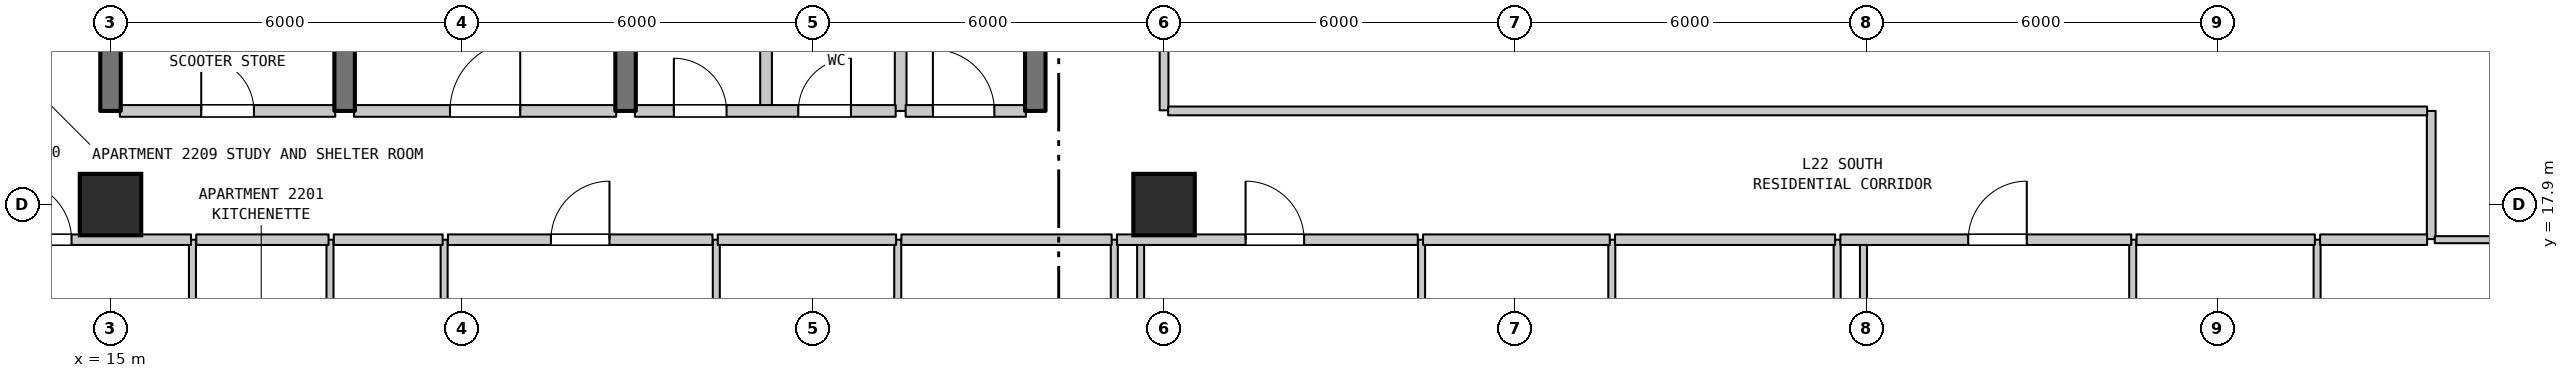
"""IFC4 building model, lengths in metres.
Left out: names, types, materials, properties, quantities, classifications, styles, units other than length and angle.
Written with IfcOpenShell. Run it as: python <this file> out.ifc"""

import sys

from ifc_helpers import new_model, si_unit, direction, frame, frame_2d, origin, origin_2d, place, context, subcontext, project, spatial, rectangle, extrude, element, fill, save


model = new_model("IFC4")
c1 = context("Model", 3, precision=1e-05, world=origin(), true_north=direction((0.0, 1.0)))
c2 = subcontext(c1, "Body", "Model", "MODEL_VIEW")
j1 = project(units=[si_unit("LENGTHUNIT", "METRE"), si_unit("PLANEANGLEUNIT", "RADIAN")], contexts=[c1])
p1 = place(None, origin())
s1 = spatial("IfcSite", under=j1, at=p1, CompositionType="ELEMENT")
p2 = place(p1, origin())
s2 = spatial("IfcBuilding", under=s1, at=p2, CompositionType="ELEMENT")
p3 = place(p2, frame((0.0, 0.0, 94.6)))
s3 = spatial("IfcBuildingStorey", under=s2, at=p3, CompositionType="ELEMENT", Elevation=94.6)
for number, where, z_axis, x_axis in (
    (1, (15.0, 17.9, 0.0), (0.0, 0.0, 1.0), (1.0, 0.0, 0.0)),
    (2, (33.0, 17.9, 0.0), (0.0, 0.0, 1.0), (1.0, 0.0, 0.0)),
):
    element("IfcColumn", number, at=place(p3, frame(where, z_axis=z_axis, x_axis=x_axis)), inside=s3, PredefinedType="COLUMN", context=c2, shape_type="SweptSolid", body=[
        extrude(rectangle(XDim=1.05, YDim=1.05, at=origin_2d()), origin(), (0.0, 0.0, 1.0), 3.7),
    ])
p4 = place(p3, frame((15.0, 19.5, 0.0), z_axis=(0.0, 0.0, 1.0), x_axis=(0.0, 1.0, 0.0)))
e3 = element("IfcWall", 3, at=p4, inside=s3, PredefinedType="SHEAR", context=c2, shape_type="SweptSolid", body=[
    extrude(rectangle(XDim=3.2, YDim=0.35, at=frame_2d((1.6, 0.0))), origin(), (0.0, 0.0, 1.0), 3.385),
])
p5 = place(p3, frame((16.4, 14.1, 0.0), z_axis=(0.0, 0.0, 1.0), x_axis=(0.0, 1.0, 0.0)))
e4 = element("IfcWall", 4, at=p5, inside=s3, PredefinedType="PARTITIONING", context=c2, shape_type="SweptSolid", body=[
    extrude(rectangle(XDim=3.2, YDim=0.12, at=frame_2d((1.6, 0.0))), origin(), (0.0, 0.0, 1.0), 3.385),
])
p6 = place(p5, frame((1.15, 0.0, 0.0)))
e5 = element("IfcOpeningElement", 5, at=p6, cuts=e4, PredefinedType="OPENING", context=c2, shape_type="SweptSolid", body=[
    extrude(rectangle(XDim=0.9, YDim=2.15, at=frame_2d((0.45, 1.075))), frame((0.0, 0.07, 0.0), z_axis=(0.0, -1.0, 0.0), x_axis=(1.0, 0.0, 0.0)), (0.0, 0.0, 1.0), 0.14),
])
p7 = place(p3, frame((18.75, 14.1, 0.0), z_axis=(0.0, 0.0, 1.0), x_axis=(0.0, 1.0, 0.0)))
e6 = element("IfcWall", 6, at=p7, inside=s3, PredefinedType="PARTITIONING", context=c2, shape_type="SweptSolid", body=[
    extrude(rectangle(XDim=3.2, YDim=0.12, at=frame_2d((1.6, 0.0))), origin(), (0.0, 0.0, 1.0), 3.385),
])
p8 = place(p3, frame((19.0, 19.5, 0.0), z_axis=(0.0, 0.0, 1.0), x_axis=(0.0, 1.0, 0.0)))
e7 = element("IfcWall", 7, at=p8, inside=s3, PredefinedType="SHEAR", context=c2, shape_type="SweptSolid", body=[
    extrude(rectangle(XDim=3.2, YDim=0.35, at=frame_2d((1.6, 0.0))), origin(), (0.0, 0.0, 1.0), 3.385),
])
p9 = place(p3, frame((20.7, 6.977, 0.0), z_axis=(0.0, 0.0, 1.0), x_axis=(0.0, 1.0, 0.0)))
e8 = element("IfcWall", 8, at=p9, inside=s3, PredefinedType="PARTITIONING", context=c2, shape_type="SweptSolid", body=[
    extrude(rectangle(XDim=10.323, YDim=0.12, at=frame_2d((5.162, 0.0))), origin(), (0.0, 0.0, 1.0), 3.385),
])
p10 = place(p3, frame((23.8, 19.5, 0.0), z_axis=(0.0, 0.0, 1.0), x_axis=(0.0, 1.0, 0.0)))
e9 = element("IfcWall", 9, at=p10, inside=s3, PredefinedType="SHEAR", context=c2, shape_type="SweptSolid", body=[
    extrude(rectangle(XDim=3.2, YDim=0.35, at=frame_2d((1.6, 0.0))), origin(), (0.0, 0.0, 1.0), 3.385),
])
p11 = place(p3, frame((25.35, 11.15, 0.0), z_axis=(0.0, 0.0, 1.0), x_axis=(0.0, 1.0, 0.0)))
e10 = element("IfcWall", 10, at=p11, inside=s3, PredefinedType="PARTITIONING", context=c2, shape_type="SweptSolid", body=[
    extrude(rectangle(XDim=6.15, YDim=0.12, at=frame_2d((3.075, 0.0))), origin(), (0.0, 0.0, 1.0), 3.385),
])
p12 = place(p3, frame((26.2, 19.5, 0.0), z_axis=(0.0, 0.0, 1.0), x_axis=(0.0, 1.0, 0.0)))
e11 = element("IfcWall", 11, at=p12, inside=s3, PredefinedType="STANDARD", context=c2, shape_type="SweptSolid", body=[
    extrude(rectangle(XDim=3.2, YDim=0.2, at=frame_2d((1.6, 0.0))), origin(), (0.0, 0.0, 1.0), 3.385),
])
p13 = place(p3, frame((28.45, 11.15, 0.0), z_axis=(0.0, 0.0, 1.0), x_axis=(0.0, 1.0, 0.0)))
e12 = element("IfcWall", 12, at=p13, inside=s3, PredefinedType="PARTITIONING", context=c2, shape_type="SweptSolid", body=[
    extrude(rectangle(XDim=6.15, YDim=0.12, at=frame_2d((3.075, 0.0))), origin(), (0.0, 0.0, 1.0), 3.385),
])
p14 = place(p3, frame((28.5, 19.5, 0.0), z_axis=(0.0, 0.0, 1.0), x_axis=(0.0, 1.0, 0.0)))
e13 = element("IfcWall", 13, at=p14, inside=s3, PredefinedType="STANDARD", context=c2, shape_type="SweptSolid", body=[
    extrude(rectangle(XDim=3.2, YDim=0.2, at=frame_2d((1.6, 0.0))), origin(), (0.0, 0.0, 1.0), 3.385),
])
p15 = place(p3, frame((30.8, 19.5, 0.0), z_axis=(0.0, 0.0, 1.0), x_axis=(0.0, 1.0, 0.0)))
e14 = element("IfcWall", 14, at=p15, inside=s3, PredefinedType="SHEAR", context=c2, shape_type="SweptSolid", body=[
    extrude(rectangle(XDim=3.2, YDim=0.35, at=frame_2d((1.6, 0.0))), origin(), (0.0, 0.0, 1.0), 3.385),
])
p16 = place(p3, frame((32.15, 11.15, 0.0), z_axis=(0.0, 0.0, 1.0), x_axis=(0.0, 1.0, 0.0)))
e15 = element("IfcWall", 15, at=p16, inside=s3, PredefinedType="PARTITIONING", context=c2, shape_type="SweptSolid", body=[
    extrude(rectangle(XDim=6.15, YDim=0.12, at=frame_2d((3.075, 0.0))), origin(), (0.0, 0.0, 1.0), 3.385),
])
p17 = place(p3, frame((32.6, 14.85, 0.0), z_axis=(0.0, 0.0, 1.0), x_axis=(0.0, 1.0, 0.0)))
e16 = element("IfcWall", 16, at=p17, inside=s3, PredefinedType="PARTITIONING", context=c2, shape_type="SweptSolid", body=[
    extrude(rectangle(XDim=2.45, YDim=0.12, at=frame_2d((1.225, 0.0))), origin(), (0.0, 0.0, 1.0), 3.385),
])
p18 = place(p3, frame((33.0, 19.51, 0.0), z_axis=(0.0, 0.0, 1.0), x_axis=(0.0, 1.0, 0.0)))
e17 = element("IfcWall", 17, at=p18, inside=s3, PredefinedType="STANDARD", context=c2, shape_type="SweptSolid", body=[
    extrude(rectangle(XDim=6.18, YDim=0.15, at=frame_2d((3.09, 0.0))), origin(), (0.0, 0.0, 1.0), 2.935),
])
for number, where, z_axis, x_axis in (
    (18, (37.4, 11.15, 0.0), (0.0, 0.0, 1.0), (0.0, 1.0, 0.0)),
    (19, (40.65, 11.15, 0.0), (0.0, 0.0, 1.0), (0.0, 1.0, 0.0)),
    (20, (44.5, 11.15, 0.0), (0.0, 0.0, 1.0), (0.0, 1.0, 0.0)),
):
    element("IfcWall", number, at=place(p3, frame(where, z_axis=z_axis, x_axis=x_axis)), inside=s3, PredefinedType="PARTITIONING", context=c2, shape_type="SweptSolid", body=[
        extrude(rectangle(XDim=6.15, YDim=0.12, at=frame_2d((3.075, 0.0))), origin(), (0.0, 0.0, 1.0), 3.385),
    ])
p19 = place(p3, frame((44.95, 0.71, 0.0), z_axis=(0.0, 0.0, 1.0), x_axis=(0.0, 1.0, 0.0)))
e21 = element("IfcWall", 21, at=p19, inside=s3, PredefinedType="PARTITIONING", context=c2, shape_type="SweptSolid", body=[
    extrude(rectangle(XDim=16.59, YDim=0.12, at=frame_2d((8.295, 0.0))), origin(), (0.0, 0.0, 1.0), 3.385),
])
for number, where, z_axis, x_axis in (
    (22, (49.55, 11.15, 0.0), (0.0, 0.0, 1.0), (0.0, 1.0, 0.0)),
    (23, (52.7, 11.15, 0.0), (0.0, 0.0, 1.0), (0.0, 1.0, 0.0)),
):
    element("IfcWall", number, at=place(p3, frame(where, z_axis=z_axis, x_axis=x_axis)), inside=s3, PredefinedType="PARTITIONING", context=c2, shape_type="SweptSolid", body=[
        extrude(rectangle(XDim=6.15, YDim=0.12, at=frame_2d((3.075, 0.0))), origin(), (0.0, 0.0, 1.0), 3.385),
    ])
p20 = place(p3, frame((54.65, 17.31, 0.0), z_axis=(0.0, 0.0, 1.0), x_axis=(0.0, 1.0, 0.0)))
e24 = element("IfcWall", 24, at=p20, inside=s3, PredefinedType="STANDARD", context=c2, shape_type="SweptSolid", body=[
    extrude(rectangle(XDim=2.19, YDim=0.15, at=frame_2d((1.095, 0.0))), origin(), (0.0, 0.0, 1.0), 3.385),
])
p21 = place(p3, frame((12.875, 17.3, 0.0), z_axis=(0.0, 0.0, 1.0), x_axis=(1.0, 0.0, 0.0)))
e25 = element("IfcWall", 25, at=p21, inside=s3, PredefinedType="STANDARD", context=c2, shape_type="SweptSolid", body=[
    extrude(rectangle(XDim=3.5, YDim=0.18, at=frame_2d((1.75, 0.0))), origin(), (0.0, 0.0, 1.0), 3.385),
])
p22 = place(p21, frame((0.459, 0.0, 0.0)))
e26 = element("IfcOpeningElement", 26, at=p22, cuts=e25, PredefinedType="OPENING", context=c2, shape_type="SweptSolid", body=[
    extrude(rectangle(XDim=1.0, YDim=2.15, at=frame_2d((0.5, 1.075))), frame((0.0, 0.1, 0.0), z_axis=(0.0, -1.0, 0.0), x_axis=(1.0, 0.0, 0.0)), (0.0, 0.0, 1.0), 0.2),
])
p23 = place(p3, frame((16.465, 17.3, 0.0), z_axis=(0.0, 0.0, 1.0), x_axis=(1.0, 0.0, 0.0)))
e27 = element("IfcWall", 27, at=p23, inside=s3, PredefinedType="STANDARD", context=c2, shape_type="SweptSolid", body=[
    extrude(rectangle(XDim=2.26, YDim=0.18, at=frame_2d((1.13, 0.0))), origin(), (0.0, 0.0, 1.0), 3.385),
])
p24 = place(p3, frame((18.815, 17.3, 0.0), z_axis=(0.0, 0.0, 1.0), x_axis=(1.0, 0.0, 0.0)))
e28 = element("IfcWall", 28, at=p24, inside=s3, PredefinedType="STANDARD", context=c2, shape_type="SweptSolid", body=[
    extrude(rectangle(XDim=1.86, YDim=0.18, at=frame_2d((0.93, 0.0))), origin(), (0.0, 0.0, 1.0), 3.385),
])
p25 = place(p3, frame((20.765, 17.3, 0.0), z_axis=(0.0, 0.0, 1.0), x_axis=(1.0, 0.0, 0.0)))
e29 = element("IfcWall", 29, at=p25, inside=s3, PredefinedType="STANDARD", context=c2, shape_type="SweptSolid", body=[
    extrude(rectangle(XDim=4.52, YDim=0.18, at=frame_2d((2.26, 0.0))), origin(), (0.0, 0.0, 1.0), 3.385),
])
p26 = place(p25, frame((1.76, 0.0, 0.0)))
e30 = element("IfcOpeningElement", 30, at=p26, cuts=e29, PredefinedType="OPENING", context=c2, shape_type="SweptSolid", body=[
    extrude(rectangle(XDim=1.0, YDim=2.15, at=frame_2d((0.5, 1.075))), frame((0.0, 0.1, 0.0), z_axis=(0.0, -1.0, 0.0), x_axis=(1.0, 0.0, 0.0)), (0.0, 0.0, 1.0), 0.2),
])
p27 = place(p3, frame((25.375, 17.3, 0.0), z_axis=(0.0, 0.0, 1.0), x_axis=(1.0, 0.0, 0.0)))
e31 = element("IfcWall", 31, at=p27, inside=s3, PredefinedType="STANDARD", context=c2, shape_type="SweptSolid", body=[
    extrude(rectangle(XDim=3.047, YDim=0.18, at=frame_2d((1.523, 0.0))), origin(), (0.0, 0.0, 1.0), 3.385),
])
p28 = place(p3, frame((28.512, 17.3, 0.0), z_axis=(0.0, 0.0, 1.0), x_axis=(1.0, 0.0, 0.0)))
e32 = element("IfcWall", 32, at=p28, inside=s3, PredefinedType="STANDARD", context=c2, shape_type="SweptSolid", body=[
    extrude(rectangle(XDim=3.593, YDim=0.18, at=frame_2d((1.796, 0.0))), origin(), (0.0, 0.0, 1.0), 3.385),
])
p29 = place(p3, frame((32.195, 17.3, 0.0), z_axis=(0.0, 0.0, 1.0), x_axis=(1.0, 0.0, 0.0)))
e33 = element("IfcWall", 33, at=p29, inside=s3, PredefinedType="STANDARD", context=c2, shape_type="SweptSolid", body=[
    extrude(rectangle(XDim=5.14, YDim=0.18, at=frame_2d((2.57, 0.0))), origin(), (0.0, 0.0, 1.0), 3.385),
])
p30 = place(p29, frame((2.198, 0.0, 0.0)))
e34 = element("IfcOpeningElement", 34, at=p30, cuts=e33, PredefinedType="OPENING", context=c2, shape_type="SweptSolid", body=[
    extrude(rectangle(XDim=1.0, YDim=2.15, at=frame_2d((0.5, 1.075))), frame((0.0, 0.1, 0.0), z_axis=(0.0, -1.0, 0.0), x_axis=(1.0, 0.0, 0.0)), (0.0, 0.0, 1.0), 0.2),
])
p31 = place(p3, frame((37.425, 17.3, 0.0), z_axis=(0.0, 0.0, 1.0), x_axis=(1.0, 0.0, 0.0)))
e35 = element("IfcWall", 35, at=p31, inside=s3, PredefinedType="STANDARD", context=c2, shape_type="SweptSolid", body=[
    extrude(rectangle(XDim=3.19, YDim=0.18, at=frame_2d((1.595, 0.0))), origin(), (0.0, 0.0, 1.0), 3.385),
])
p32 = place(p3, frame((40.705, 17.3, 0.0), z_axis=(0.0, 0.0, 1.0), x_axis=(1.0, 0.0, 0.0)))
e36 = element("IfcWall", 36, at=p32, inside=s3, PredefinedType="STANDARD", context=c2, shape_type="SweptSolid", body=[
    extrude(rectangle(XDim=3.76, YDim=0.18, at=frame_2d((1.88, 0.0))), origin(), (0.0, 0.0, 1.0), 3.385),
])
p33 = place(p3, frame((44.555, 17.3, 0.0), z_axis=(0.0, 0.0, 1.0), x_axis=(1.0, 0.0, 0.0)))
e37 = element("IfcWall", 37, at=p33, inside=s3, PredefinedType="STANDARD", context=c2, shape_type="SweptSolid", body=[
    extrude(rectangle(XDim=4.97, YDim=0.18, at=frame_2d((2.485, 0.0))), origin(), (0.0, 0.0, 1.0), 3.385),
])
p34 = place(p33, frame((2.185, 0.0, 0.0)))
e38 = element("IfcOpeningElement", 38, at=p34, cuts=e37, PredefinedType="OPENING", context=c2, shape_type="SweptSolid", body=[
    extrude(rectangle(XDim=1.0, YDim=2.15, at=frame_2d((0.5, 1.075))), frame((0.0, 0.1, 0.0), z_axis=(0.0, -1.0, 0.0), x_axis=(1.0, 0.0, 0.0)), (0.0, 0.0, 1.0), 0.2),
])
p35 = place(p3, frame((49.615, 17.3, 0.0), z_axis=(0.0, 0.0, 1.0), x_axis=(1.0, 0.0, 0.0)))
e39 = element("IfcWall", 39, at=p35, inside=s3, PredefinedType="STANDARD", context=c2, shape_type="SweptSolid", body=[
    extrude(rectangle(XDim=3.047, YDim=0.18, at=frame_2d((1.523, 0.0))), origin(), (0.0, 0.0, 1.0), 3.385),
])
p36 = place(p3, frame((52.752, 17.3, 0.0), z_axis=(0.0, 0.0, 1.0), x_axis=(1.0, 0.0, 0.0)))
e40 = element("IfcWall", 40, at=p36, inside=s3, PredefinedType="STANDARD", context=c2, shape_type="SweptSolid", body=[
    extrude(rectangle(XDim=1.828, YDim=0.18, at=frame_2d((0.914, 0.0))), origin(), (0.0, 0.0, 1.0), 3.385),
])
p37 = place(p3, frame((54.71, 17.3, 0.0), z_axis=(0.0, 0.0, 1.0), x_axis=(1.0, 0.0, 0.0)))
e41 = element("IfcWall", 41, at=p37, inside=s3, PredefinedType="PARTITIONING", context=c2, shape_type="SweptSolid", body=[
    extrude(rectangle(XDim=1.635, YDim=0.12, at=frame_2d((0.817, 0.0))), origin(), (0.0, 0.0, 1.0), 3.385),
])
p38 = place(p3, frame((15.16, 19.5, 0.0), z_axis=(0.0, 0.0, 1.0), x_axis=(1.0, 0.0, 0.0)))
e42 = element("IfcWall", 42, at=p38, inside=s3, PredefinedType="STANDARD", context=c2, shape_type="SweptSolid", body=[
    extrude(rectangle(XDim=3.68, YDim=0.2, at=frame_2d((1.84, 0.0))), origin(), (0.0, 0.0, 1.0), 3.385),
])
p39 = place(p38, frame((1.39, 0.0, 0.0)))
e43 = element("IfcOpeningElement", 43, at=p39, cuts=e42, PredefinedType="OPENING", context=c2, shape_type="SweptSolid", body=[
    extrude(rectangle(XDim=0.9, YDim=2.15, at=frame_2d((0.45, 1.075))), frame((0.0, 0.11, 0.0), z_axis=(0.0, -1.0, 0.0), x_axis=(1.0, 0.0, 0.0)), (0.0, 0.0, 1.0), 0.22),
])
p40 = place(p3, frame((19.16, 19.5, 0.0), z_axis=(0.0, 0.0, 1.0), x_axis=(1.0, 0.0, 0.0)))
e44 = element("IfcWall", 44, at=p40, inside=s3, PredefinedType="STANDARD", context=c2, shape_type="SweptSolid", body=[
    extrude(rectangle(XDim=4.48, YDim=0.2, at=frame_2d((2.24, 0.0))), origin(), (0.0, 0.0, 1.0), 3.385),
])
p41 = place(p40, frame((1.64, 0.0, 0.0)))
e45 = element("IfcOpeningElement", 45, at=p41, cuts=e44, PredefinedType="OPENING", context=c2, shape_type="SweptSolid", body=[
    extrude(rectangle(XDim=1.2, YDim=2.2, at=frame_2d((0.6, 1.1))), frame((0.0, 0.11, 0.0), z_axis=(0.0, -1.0, 0.0), x_axis=(1.0, 0.0, 0.0)), (0.0, 0.0, 1.0), 0.22),
])
p42 = place(p3, frame((23.96, 19.5, 0.0), z_axis=(0.0, 0.0, 1.0), x_axis=(1.0, 0.0, 0.0)))
e46 = element("IfcWall", 46, at=p42, inside=s3, PredefinedType="STANDARD", context=c2, shape_type="SweptSolid", body=[
    extrude(rectangle(XDim=4.455, YDim=0.2, at=frame_2d((2.228, 0.0))), origin(), (0.0, 0.0, 1.0), 3.385),
])
p43 = place(p42, frame((0.665, 0.0, 0.0)))
e47 = element("IfcOpeningElement", 47, at=p43, cuts=e46, PredefinedType="OPENING", context=c2, shape_type="SweptSolid", body=[
    extrude(rectangle(XDim=0.9, YDim=2.15, at=frame_2d((0.45, 1.075))), frame((0.0, 0.11, 0.0), z_axis=(0.0, -1.0, 0.0), x_axis=(1.0, 0.0, 0.0)), (0.0, 0.0, 1.0), 0.22),
])
p44 = place(p42, frame((2.791, 0.0, 0.0)))
e48 = element("IfcOpeningElement", 48, at=p44, cuts=e46, PredefinedType="OPENING", context=c2, shape_type="SweptSolid", body=[
    extrude(rectangle(XDim=0.9, YDim=2.15, at=frame_2d((0.45, 1.075))), frame((0.0, 0.11, 0.0), z_axis=(0.0, -1.0, 0.0), x_axis=(1.0, 0.0, 0.0)), (0.0, 0.0, 1.0), 0.22),
])
p45 = place(p3, frame((28.585, 19.5, 0.0), z_axis=(0.0, 0.0, 1.0), x_axis=(1.0, 0.0, 0.0)))
e49 = element("IfcWall", 49, at=p45, inside=s3, PredefinedType="STANDARD", context=c2, shape_type="SweptSolid", body=[
    extrude(rectangle(XDim=2.055, YDim=0.2, at=frame_2d((1.027, 0.0))), origin(), (0.0, 0.0, 1.0), 3.385),
])
p46 = place(p45, frame((0.466, 0.0, 0.0)))
e50 = element("IfcOpeningElement", 50, at=p46, cuts=e49, PredefinedType="OPENING", context=c2, shape_type="SweptSolid", body=[
    extrude(rectangle(XDim=1.05, YDim=2.15, at=frame_2d((0.525, 1.075))), frame((0.0, 0.11, 0.0), z_axis=(0.0, -1.0, 0.0), x_axis=(1.0, 0.0, 0.0)), (0.0, 0.0, 1.0), 0.22),
])
p47 = place(p3, frame((33.07, 19.5, 0.0), z_axis=(0.0, 0.0, 1.0), x_axis=(1.0, 0.0, 0.0)))
e51 = element("IfcWall", 51, at=p47, inside=s3, PredefinedType="STANDARD", context=c2, shape_type="SweptSolid", body=[
    extrude(rectangle(XDim=21.51, YDim=0.15, at=frame_2d((10.755, 0.0))), origin(), (0.0, 0.0, 1.0), 3.385),
])
p48 = place(p22, origin())
e52 = element("IfcDoor", 52, at=p48, inside=s3, OperationType="SINGLE_SWING_LEFT", PredefinedType="DOOR", context=c2, shape_type="SweptSolid", body=[
    extrude(rectangle(XDim=1.0, YDim=2.15, at=frame_2d((0.5, 1.075))), frame((0.0, 0.025, 0.0), z_axis=(0.0, -1.0, 0.0), x_axis=(1.0, 0.0, 0.0)), (0.0, 0.0, 1.0), 0.05),
])
fill(e26, e52)
p49 = place(p26, origin())
e53 = element("IfcDoor", 53, at=p49, inside=s3, OperationType="SINGLE_SWING_RIGHT", PredefinedType="DOOR", context=c2, shape_type="SweptSolid", body=[
    extrude(rectangle(XDim=1.0, YDim=2.15, at=frame_2d((0.5, 1.075))), frame((0.0, 0.025, 0.0), z_axis=(0.0, -1.0, 0.0), x_axis=(1.0, 0.0, 0.0)), (0.0, 0.0, 1.0), 0.05),
])
fill(e30, e53)
p50 = place(p30, origin())
e54 = element("IfcDoor", 54, at=p50, inside=s3, OperationType="SINGLE_SWING_LEFT", PredefinedType="DOOR", context=c2, shape_type="SweptSolid", body=[
    extrude(rectangle(XDim=1.0, YDim=2.15, at=frame_2d((0.5, 1.075))), frame((0.0, 0.025, 0.0), z_axis=(0.0, -1.0, 0.0), x_axis=(1.0, 0.0, 0.0)), (0.0, 0.0, 1.0), 0.05),
])
fill(e34, e54)
p51 = place(p34, origin())
e55 = element("IfcDoor", 55, at=p51, inside=s3, OperationType="SINGLE_SWING_RIGHT", PredefinedType="DOOR", context=c2, shape_type="SweptSolid", body=[
    extrude(rectangle(XDim=1.0, YDim=2.15, at=frame_2d((0.5, 1.075))), frame((0.0, 0.025, 0.0), z_axis=(0.0, -1.0, 0.0), x_axis=(1.0, 0.0, 0.0)), (0.0, 0.0, 1.0), 0.05),
])
fill(e38, e55)
p52 = place(p39, origin())
e56 = element("IfcDoor", 56, at=p52, inside=s3, OperationType="SINGLE_SWING_LEFT", PredefinedType="DOOR", context=c2, shape_type="SweptSolid", body=[
    extrude(rectangle(XDim=0.9, YDim=2.15, at=frame_2d((0.45, 1.075))), frame((0.0, 0.025, 0.0), z_axis=(0.0, -1.0, 0.0), x_axis=(1.0, 0.0, 0.0)), (0.0, 0.0, 1.0), 0.05),
])
fill(e43, e56)
p53 = place(p41, origin())
e57 = element("IfcDoor", 57, at=p53, inside=s3, OperationType="SINGLE_SWING_RIGHT", PredefinedType="DOOR", context=c2, shape_type="SweptSolid", body=[
    extrude(rectangle(XDim=1.2, YDim=2.2, at=frame_2d((0.6, 1.1))), frame((0.0, 0.025, 0.0), z_axis=(0.0, -1.0, 0.0), x_axis=(1.0, 0.0, 0.0)), (0.0, 0.0, 1.0), 0.05),
])
fill(e45, e57)
p54 = place(p43, origin())
e58 = element("IfcDoor", 58, at=p54, inside=s3, OperationType="SINGLE_SWING_LEFT", PredefinedType="DOOR", context=c2, shape_type="SweptSolid", body=[
    extrude(rectangle(XDim=0.9, YDim=2.15, at=frame_2d((0.45, 1.075))), frame((0.0, 0.025, 0.0), z_axis=(0.0, -1.0, 0.0), x_axis=(1.0, 0.0, 0.0)), (0.0, 0.0, 1.0), 0.05),
])
fill(e47, e58)
p55 = place(p44, origin())
e59 = element("IfcDoor", 59, at=p55, inside=s3, OperationType="SINGLE_SWING_RIGHT", PredefinedType="DOOR", context=c2, shape_type="SweptSolid", body=[
    extrude(rectangle(XDim=0.9, YDim=2.15, at=frame_2d((0.45, 1.075))), frame((0.0, 0.025, 0.0), z_axis=(0.0, -1.0, 0.0), x_axis=(1.0, 0.0, 0.0)), (0.0, 0.0, 1.0), 0.05),
])
fill(e48, e59)
p56 = place(p46, origin())
e60 = element("IfcDoor", 60, at=p56, inside=s3, OperationType="SINGLE_SWING_LEFT", PredefinedType="DOOR", context=c2, shape_type="SweptSolid", body=[
    extrude(rectangle(XDim=1.05, YDim=2.15, at=frame_2d((0.525, 1.075))), frame((0.0, 0.025, 0.0), z_axis=(0.0, -1.0, 0.0), x_axis=(1.0, 0.0, 0.0)), (0.0, 0.0, 1.0), 0.05),
])
fill(e50, e60)
save(model, sys.argv[1])
